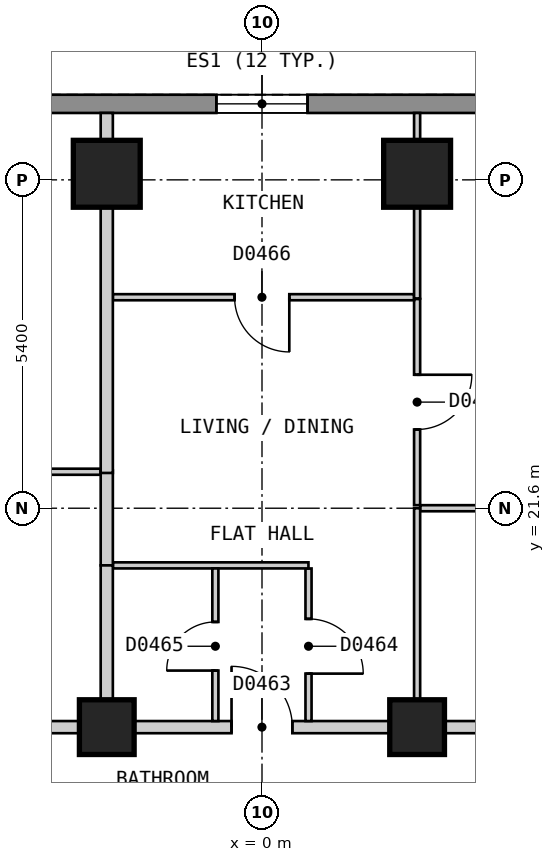
"""IFC4 building model, lengths in metres.
Left out: names, types, materials, properties, quantities, classifications, styles, units other than length and angle.
Written with IfcOpenShell. Run it as: python <this file> out.ifc"""

import sys

from ifc_helpers import new_model, si_unit, direction, frame, frame_2d, origin, origin_2d, place, context, subcontext, project, spatial, polyline, rectangle, outline, extrude, element, fill, save


model = new_model("IFC4")
c1 = context("Model", 3, precision=1e-05, world=origin(), true_north=direction((0.0, 1.0)))
c2 = subcontext(c1, "Body", "Model", "MODEL_VIEW")
j1 = project(units=[si_unit("LENGTHUNIT", "METRE"), si_unit("PLANEANGLEUNIT", "RADIAN")], contexts=[c1])
p1 = place(None, origin())
s1 = spatial("IfcSite", under=j1, at=p1, CompositionType="ELEMENT")
p2 = place(p1, origin())
s2 = spatial("IfcBuilding", under=s1, at=p2, CompositionType="ELEMENT")
p3 = place(p2, frame((0.0, 0.0, 32.4)))
s3 = spatial("IfcBuildingStorey", under=s2, at=p3, CompositionType="ELEMENT", Elevation=32.4)
for number, where, z_axis, x_axis in (
    (1, (2.551, 27.1, 0.0), (0.0, 0.0, 1.0), (-1.0, 0.0, 0.0)),
    (2, (-2.553, 27.1, 0.0), (0.0, 0.0, 1.0), (-1.0, 0.0, 0.0)),
):
    element("IfcColumn", number, at=place(p3, frame(where, z_axis=z_axis, x_axis=x_axis)), inside=s3, PredefinedType="COLUMN", context=c2, shape_type="SweptSolid", body=[
        extrude(rectangle(XDim=1.1, YDim=1.1, at=origin_2d()), origin(), (0.0, 0.0, 1.0), 3.0),
    ])
for number, where, z_axis, x_axis in (
    (3, (2.551, 18.0, 0.0), (0.0, 0.0, 1.0), (-1.0, 0.0, 0.0)),
    (4, (-2.553, 18.0, 0.0), (0.0, 0.0, 1.0), (-1.0, 0.0, 0.0)),
):
    element("IfcColumn", number, at=place(p3, frame(where, z_axis=z_axis, x_axis=x_axis)), inside=s3, PredefinedType="COLUMN", context=c2, shape_type="SweptSolid", body=[
        extrude(rectangle(XDim=0.9, YDim=0.9, at=origin_2d()), origin(), (0.0, 0.0, 1.0), 3.0),
    ])
p4 = place(p3, frame((13.51, 28.25, 0.0), z_axis=(0.0, 0.0, 1.0), x_axis=(-1.0, 0.0, 0.0)))
e5 = element("IfcWall", 5, at=p4, inside=s3, PredefinedType="SOLIDWALL", context=c2, shape_type="SweptSolid", body=[
    extrude(outline(polyline([(0.0, -0.15), (27.02, -0.15), (26.94, 0.15), (0.08, 0.15), (0.0, -0.15)])), origin(), (0.0, 0.0, 1.0), 2.7),
])
p5 = place(p4, frame((2.553, 0.0, 0.15)))
e6 = element("IfcOpeningElement", 6, at=p5, cuts=e5, PredefinedType="OPENING", context=c2, shape_type="SweptSolid", body=[
    extrude(rectangle(XDim=1.5, YDim=2.1, at=frame_2d((0.75, 1.05))), frame((0.0, 0.16, 0.0), z_axis=(0.0, -1.0, 0.0), x_axis=(1.0, 0.0, 0.0)), (0.0, 0.0, 1.0), 0.32),
])
p6 = place(p4, frame((7.657, 0.0, 0.15)))
e7 = element("IfcOpeningElement", 7, at=p6, cuts=e5, PredefinedType="OPENING", context=c2, shape_type="SweptSolid", body=[
    extrude(rectangle(XDim=1.5, YDim=2.1, at=frame_2d((0.75, 1.05))), frame((0.0, 0.16, 0.0), z_axis=(0.0, -1.0, 0.0), x_axis=(1.0, 0.0, 0.0)), (0.0, 0.0, 1.0), 0.32),
])
p7 = place(p4, frame((12.761, 0.0, 0.15)))
e8 = element("IfcOpeningElement", 8, at=p7, cuts=e5, PredefinedType="OPENING", context=c2, shape_type="SweptSolid", body=[
    extrude(rectangle(XDim=1.5, YDim=2.1, at=frame_2d((0.75, 1.05))), frame((0.0, 0.16, 0.0), z_axis=(0.0, -1.0, 0.0), x_axis=(1.0, 0.0, 0.0)), (0.0, 0.0, 1.0), 0.32),
])
p8 = place(p4, frame((17.865, 0.0, 0.15)))
e9 = element("IfcOpeningElement", 9, at=p8, cuts=e5, PredefinedType="OPENING", context=c2, shape_type="SweptSolid", body=[
    extrude(rectangle(XDim=1.5, YDim=2.1, at=frame_2d((0.75, 1.05))), frame((0.0, 0.16, 0.0), z_axis=(0.0, -1.0, 0.0), x_axis=(1.0, 0.0, 0.0)), (0.0, 0.0, 1.0), 0.32),
])
p9 = place(p4, frame((22.969, 0.0, 0.15)))
e10 = element("IfcOpeningElement", 10, at=p9, cuts=e5, PredefinedType="OPENING", context=c2, shape_type="SweptSolid", body=[
    extrude(rectangle(XDim=1.5, YDim=2.1, at=frame_2d((0.75, 1.05))), frame((0.0, 0.16, 0.0), z_axis=(0.0, -1.0, 0.0), x_axis=(1.0, 0.0, 0.0)), (0.0, 0.0, 1.0), 0.32),
])
p10 = place(p3, frame((-10.276, 18.0, 0.0), z_axis=(0.0, 0.0, 1.0), x_axis=(1.0, 0.0, 0.0)))
e11 = element("IfcWall", 11, at=p10, inside=s3, PredefinedType="PARTITIONING", context=c2, shape_type="SweptSolid", body=[
    extrude(rectangle(XDim=20.5, YDim=0.2, at=frame_2d((10.25, 0.0))), origin(), (0.0, 0.0, 1.0), 2.7),
])
p11 = place(p10, frame((19.265, 0.0, 0.0)))
e12 = element("IfcOpeningElement", 12, at=p11, cuts=e11, PredefinedType="OPENING", context=c2, shape_type="SweptSolid", body=[
    extrude(rectangle(XDim=1.0, YDim=2.1, at=frame_2d((0.5, 1.05))), frame((0.0, 0.11, 0.0), z_axis=(0.0, -1.0, 0.0), x_axis=(1.0, 0.0, 0.0)), (0.0, 0.0, 1.0), 0.22),
])
p12 = place(p10, frame((9.775, 0.0, 0.0)))
e13 = element("IfcOpeningElement", 13, at=p12, cuts=e11, PredefinedType="OPENING", context=c2, shape_type="SweptSolid", body=[
    extrude(rectangle(XDim=1.0, YDim=2.1, at=frame_2d((0.5, 1.05))), frame((0.0, 0.11, 0.0), z_axis=(0.0, -1.0, 0.0), x_axis=(1.0, 0.0, 0.0)), (0.0, 0.0, 1.0), 0.22),
])
p13 = place(p10, frame((4.671, 0.0, 0.0)))
e14 = element("IfcOpeningElement", 14, at=p13, cuts=e11, PredefinedType="OPENING", context=c2, shape_type="SweptSolid", body=[
    extrude(rectangle(XDim=1.0, YDim=2.1, at=frame_2d((0.5, 1.05))), frame((0.0, 0.11, 0.0), z_axis=(0.0, -1.0, 0.0), x_axis=(1.0, 0.0, 0.0)), (0.0, 0.0, 1.0), 0.22),
])
p14 = place(p3, frame((0.765, 20.609, 0.0), z_axis=(0.0, 0.0, 1.0), x_axis=(0.0, -1.0, 0.0)))
e15 = element("IfcWall", 15, at=p14, inside=s3, PredefinedType="PARTITIONING", context=c2, shape_type="SweptSolid", body=[
    extrude(rectangle(XDim=2.509, YDim=0.1, at=frame_2d((1.254, 0.0))), origin(), (0.0, 0.0, 1.0), 2.7),
])
p15 = place(p14, frame((0.829, 0.0, 0.0)))
e16 = element("IfcOpeningElement", 16, at=p15, cuts=e15, PredefinedType="OPENING", context=c2, shape_type="SweptSolid", body=[
    extrude(rectangle(XDim=0.9, YDim=2.1, at=frame_2d((0.45, 1.05))), frame((0.0, 0.06, 0.0), z_axis=(0.0, -1.0, 0.0), x_axis=(1.0, 0.0, 0.0)), (0.0, 0.0, 1.0), 0.12),
])
p16 = place(p3, frame((2.551, 25.04, 0.0), z_axis=(0.0, 0.0, 1.0), x_axis=(0.0, -1.0, 0.0)))
e17 = element("IfcWall", 17, at=p16, inside=s3, PredefinedType="PARTITIONING", context=c2, shape_type="SweptSolid", body=[
    extrude(rectangle(XDim=3.39, YDim=0.1, at=frame_2d((1.695, 0.0))), origin(), (0.0, 0.0, 1.0), 2.7),
])
p17 = place(p16, frame((1.245, 0.0, 0.0)))
e18 = element("IfcOpeningElement", 18, at=p17, cuts=e17, PredefinedType="OPENING", context=c2, shape_type="SweptSolid", body=[
    extrude(rectangle(XDim=0.9, YDim=2.1, at=frame_2d((0.45, 1.05))), frame((0.0, 0.06, 0.0), z_axis=(0.0, -1.0, 0.0), x_axis=(1.0, 0.0, 0.0)), (0.0, 0.0, 1.0), 0.12),
])
p18 = place(p3, frame((-2.453, 20.66, 0.0), z_axis=(0.0, 0.0, 1.0), x_axis=(1.0, 0.0, 0.0)))
e19 = element("IfcWall", 19, at=p18, inside=s3, PredefinedType="PARTITIONING", context=c2, shape_type="SweptSolid", body=[
    extrude(rectangle(XDim=3.217, YDim=0.1, at=frame_2d((1.608, 0.0))), origin(), (0.0, 0.0, 1.0), 2.7),
])
p19 = place(p3, frame((2.601, 21.6, 0.0), z_axis=(0.0, 0.0, 1.0), x_axis=(1.0, 0.0, 0.0)))
e20 = element("IfcWall", 20, at=p19, inside=s3, PredefinedType="PARTITIONING", context=c2, shape_type="SweptSolid", body=[
    extrude(rectangle(XDim=4.954, YDim=0.1, at=frame_2d((2.477, 0.0))), origin(), (0.0, 0.0, 1.0), 2.7),
])
p20 = place(p19, frame((2.102, 0.0, 0.0)))
e21 = element("IfcOpeningElement", 21, at=p20, cuts=e20, PredefinedType="OPENING", context=c2, shape_type="SweptSolid", body=[
    extrude(rectangle(XDim=0.8, YDim=2.1, at=frame_2d((0.4, 1.05))), frame((0.0, 0.06, 0.0), z_axis=(0.0, -1.0, 0.0), x_axis=(1.0, 0.0, 0.0)), (0.0, 0.0, 1.0), 0.12),
])
p21 = place(p3, frame((-12.711, 22.2, 0.0), z_axis=(0.0, 0.0, 1.0), x_axis=(1.0, 0.0, 0.0)))
e22 = element("IfcWall", 22, at=p21, inside=s3, PredefinedType="PARTITIONING", context=c2, shape_type="SweptSolid", body=[
    extrude(rectangle(XDim=10.058, YDim=0.1, at=frame_2d((5.029, 0.0))), origin(), (0.0, 0.0, 1.0), 2.7),
])
p22 = place(p21, frame((7.156, 0.0, 0.0)))
e23 = element("IfcOpeningElement", 23, at=p22, cuts=e22, PredefinedType="OPENING", context=c2, shape_type="SweptSolid", body=[
    extrude(rectangle(XDim=0.9, YDim=2.1, at=frame_2d((0.45, 1.05))), frame((0.0, 0.06, 0.0), z_axis=(0.0, -1.0, 0.0), x_axis=(1.0, 0.0, 0.0)), (0.0, 0.0, 1.0), 0.12),
])
p23 = place(p21, frame((2.102, 0.0, 0.0)))
e24 = element("IfcOpeningElement", 24, at=p23, cuts=e22, PredefinedType="OPENING", context=c2, shape_type="SweptSolid", body=[
    extrude(rectangle(XDim=0.8, YDim=2.1, at=frame_2d((0.4, 1.05))), frame((0.0, 0.06, 0.0), z_axis=(0.0, -1.0, 0.0), x_axis=(1.0, 0.0, 0.0)), (0.0, 0.0, 1.0), 0.12),
])
p24 = place(p3, frame((-2.453, 25.07, 0.0), z_axis=(0.0, 0.0, 1.0), x_axis=(1.0, 0.0, 0.0)))
e25 = element("IfcWall", 25, at=p24, inside=s3, PredefinedType="PARTITIONING", context=c2, shape_type="SweptSolid", body=[
    extrude(rectangle(XDim=4.954, YDim=0.1, at=frame_2d((2.477, 0.0))), origin(), (0.0, 0.0, 1.0), 2.7),
])
p25 = place(p24, frame((2.002, 0.0, 0.0)))
e26 = element("IfcOpeningElement", 26, at=p25, cuts=e25, PredefinedType="OPENING", context=c2, shape_type="SweptSolid", body=[
    extrude(rectangle(XDim=0.9, YDim=2.1, at=frame_2d((0.45, 1.05))), frame((0.0, 0.06, 0.0), z_axis=(0.0, -1.0, 0.0), x_axis=(1.0, 0.0, 0.0)), (0.0, 0.0, 1.0), 0.12),
])
p26 = place(p3, frame((2.551, 18.1, 0.0), z_axis=(0.0, 0.0, 1.0), x_axis=(0.0, 1.0, 0.0)))
e27 = element("IfcWall", 27, at=p26, inside=s3, PredefinedType="PARTITIONING", context=c2, shape_type="SweptSolid", body=[
    extrude(rectangle(XDim=3.5, YDim=0.1, at=frame_2d((1.75, 0.0))), origin(), (0.0, 0.0, 1.0), 2.7),
])
p27 = place(p3, frame((2.551, 25.05, 0.0), z_axis=(0.0, 0.0, 1.0), x_axis=(0.0, 1.0, 0.0)))
e28 = element("IfcWall", 28, at=p27, inside=s3, PredefinedType="PARTITIONING", context=c2, shape_type="SweptSolid", body=[
    extrude(rectangle(XDim=3.05, YDim=0.1, at=frame_2d((1.525, 0.0))), origin(), (0.0, 0.0, 1.0), 2.7),
])
p28 = place(p3, frame((-0.767, 18.1, 0.0), z_axis=(0.0, 0.0, 1.0), x_axis=(0.0, 1.0, 0.0)))
e29 = element("IfcWall", 29, at=p28, inside=s3, PredefinedType="PARTITIONING", context=c2, shape_type="SweptSolid", body=[
    extrude(rectangle(XDim=2.51, YDim=0.1, at=frame_2d((1.255, 0.0))), origin(), (0.0, 0.0, 1.0), 2.7),
])
p29 = place(p28, frame((0.83, 0.0, 0.0)))
e30 = element("IfcOpeningElement", 30, at=p29, cuts=e29, PredefinedType="OPENING", context=c2, shape_type="SweptSolid", body=[
    extrude(rectangle(XDim=0.8, YDim=2.1, at=frame_2d((0.4, 1.05))), frame((0.0, 0.06, 0.0), z_axis=(0.0, -1.0, 0.0), x_axis=(1.0, 0.0, 0.0)), (0.0, 0.0, 1.0), 0.12),
])
p30 = place(p3, frame((-2.553, 22.22, 0.0), z_axis=(0.0, 0.0, 1.0), x_axis=(0.0, -1.0, 0.0)))
e31 = element("IfcWall", 31, at=p30, inside=s3, PredefinedType="PARTITIONING", context=c2, shape_type="SweptSolid", body=[
    extrude(rectangle(XDim=1.56, YDim=0.2, at=frame_2d((0.78, 0.0))), origin(), (0.0, 0.0, 1.0), 2.7),
])
p31 = place(p3, frame((-2.553, 18.1, 0.0), z_axis=(0.0, 0.0, 1.0), x_axis=(0.0, 1.0, 0.0)))
e32 = element("IfcWall", 32, at=p31, inside=s3, PredefinedType="PARTITIONING", context=c2, shape_type="SweptSolid", body=[
    extrude(rectangle(XDim=2.56, YDim=0.2, at=frame_2d((1.28, 0.0))), origin(), (0.0, 0.0, 1.0), 2.7),
])
p32 = place(p3, frame((-2.553, 22.18, 0.0), z_axis=(0.0, 0.0, 1.0), x_axis=(0.0, 1.0, 0.0)))
e33 = element("IfcWall", 33, at=p32, inside=s3, PredefinedType="PARTITIONING", context=c2, shape_type="SweptSolid", body=[
    extrude(rectangle(XDim=5.92, YDim=0.2, at=frame_2d((2.96, 0.0))), origin(), (0.0, 0.0, 1.0), 2.7),
])
p33 = place(p7, origin())
e34 = element("IfcWindow", 34, at=p33, inside=s3, PartitioningType="SINGLE_PANEL", PredefinedType="WINDOW", context=c2, shape_type="SweptSolid", body=[
    extrude(rectangle(XDim=1.5, YDim=2.1, at=frame_2d((0.75, 1.05))), frame((0.0, 0.03, 0.0), z_axis=(0.0, -1.0, 0.0), x_axis=(1.0, 0.0, 0.0)), (0.0, 0.0, 1.0), 0.06),
])
fill(e8, e34)
p34 = place(p12, origin())
e35 = element("IfcDoor", 35, at=p34, inside=s3, OperationType="SINGLE_SWING_LEFT", PredefinedType="DOOR", context=c2, shape_type="SweptSolid", body=[
    extrude(rectangle(XDim=1.0, YDim=2.1, at=frame_2d((0.5, 1.05))), frame((0.0, 0.025, 0.0), z_axis=(0.0, -1.0, 0.0), x_axis=(1.0, 0.0, 0.0)), (0.0, 0.0, 1.0), 0.05),
])
fill(e13, e35)
p35 = place(p15, origin())
e36 = element("IfcDoor", 36, at=p35, inside=s3, OperationType="SINGLE_SWING_RIGHT", PredefinedType="DOOR", context=c2, shape_type="SweptSolid", body=[
    extrude(rectangle(XDim=0.9, YDim=2.1, at=frame_2d((0.45, 1.05))), frame((0.0, 0.025, 0.0), z_axis=(0.0, -1.0, 0.0), x_axis=(1.0, 0.0, 0.0)), (0.0, 0.0, 1.0), 0.05),
])
fill(e16, e36)
p36 = place(p29, origin())
e37 = element("IfcDoor", 37, at=p36, inside=s3, OperationType="SINGLE_SWING_LEFT", PredefinedType="DOOR", context=c2, shape_type="SweptSolid", body=[
    extrude(rectangle(XDim=0.8, YDim=2.1, at=frame_2d((0.4, 1.05))), frame((0.0, 0.025, 0.0), z_axis=(0.0, -1.0, 0.0), x_axis=(1.0, 0.0, 0.0)), (0.0, 0.0, 1.0), 0.05),
])
fill(e30, e37)
p37 = place(p25, origin())
e38 = element("IfcDoor", 38, at=p37, inside=s3, OperationType="SINGLE_SWING_RIGHT", PredefinedType="DOOR", context=c2, shape_type="SweptSolid", body=[
    extrude(rectangle(XDim=0.9, YDim=2.1, at=frame_2d((0.45, 1.05))), frame((0.0, 0.025, 0.0), z_axis=(0.0, -1.0, 0.0), x_axis=(1.0, 0.0, 0.0)), (0.0, 0.0, 1.0), 0.05),
])
fill(e26, e38)
p38 = place(p17, origin())
e39 = element("IfcDoor", 39, at=p38, inside=s3, OperationType="SINGLE_SWING_LEFT", PredefinedType="DOOR", context=c2, shape_type="SweptSolid", body=[
    extrude(rectangle(XDim=0.9, YDim=2.1, at=frame_2d((0.45, 1.05))), frame((0.0, 0.025, 0.0), z_axis=(0.0, -1.0, 0.0), x_axis=(1.0, 0.0, 0.0)), (0.0, 0.0, 1.0), 0.05),
])
fill(e18, e39)
save(model, sys.argv[1])
